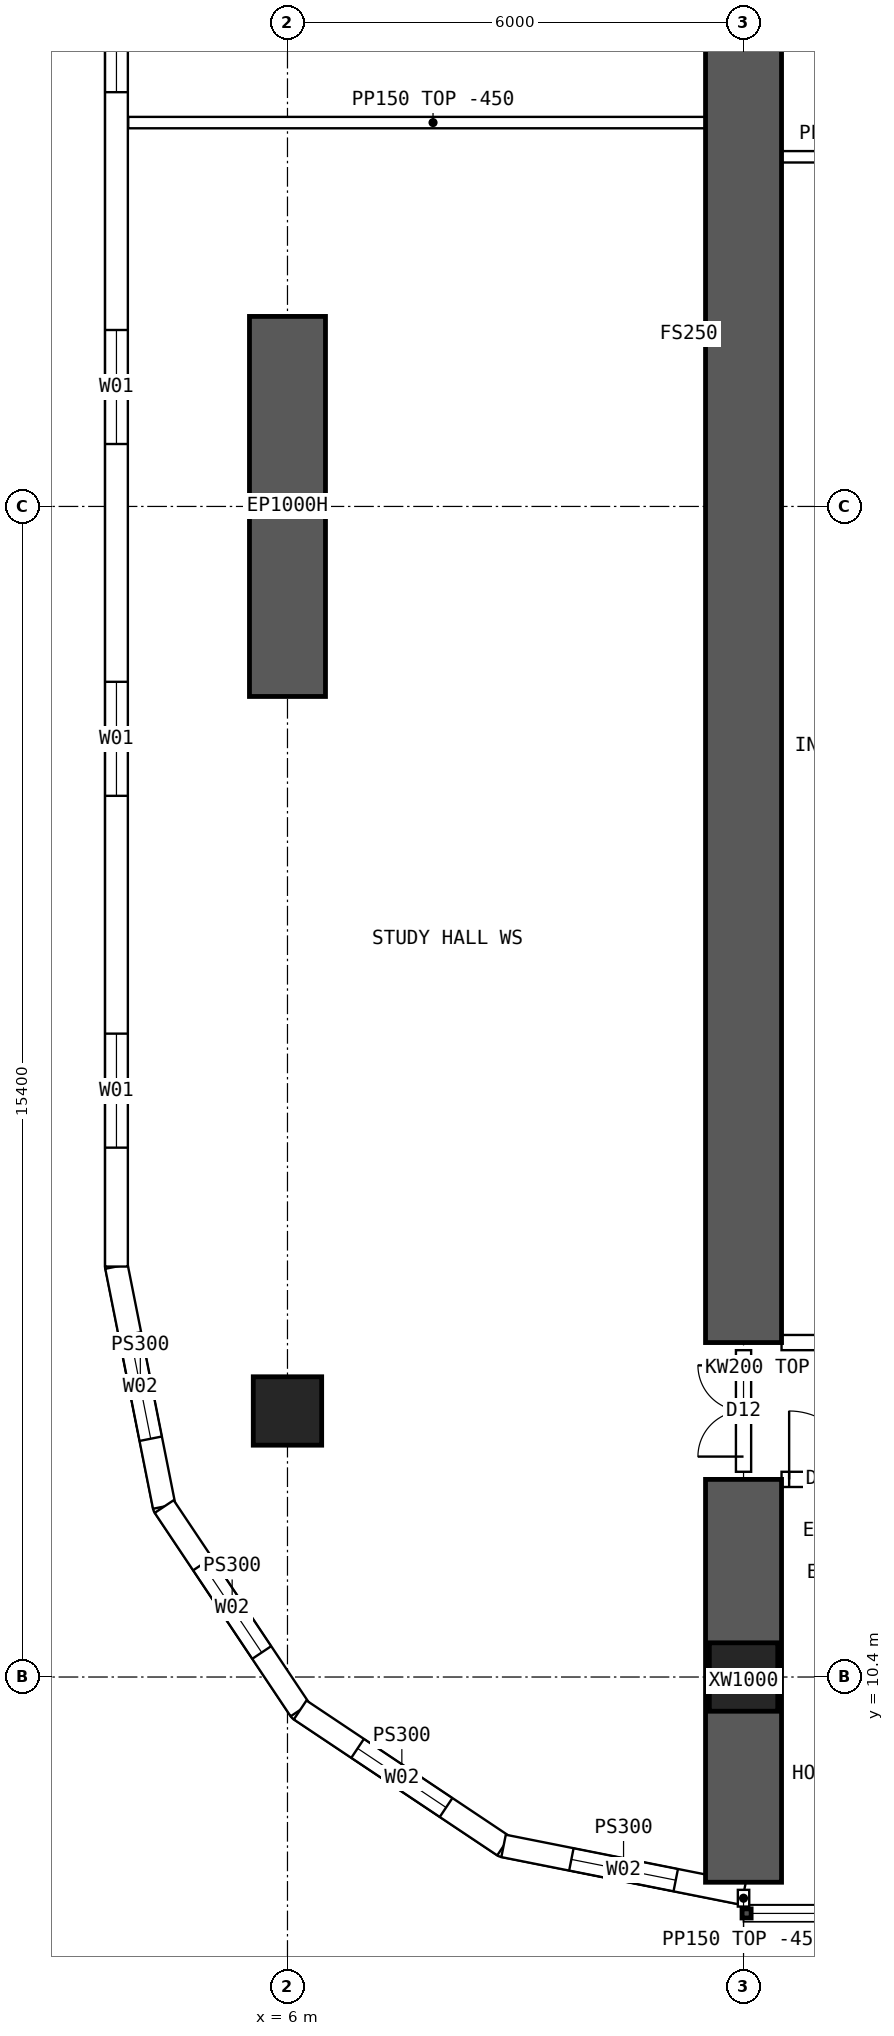
"""IFC4 building model, lengths in metres.
Left out: names, types, materials, properties, quantities, classifications, styles, units other than length and angle.
Written with IfcOpenShell. Run it as: python <this file> out.ifc"""

import sys

from ifc_helpers import new_model, si_unit, direction, frame, frame_2d, origin, origin_2d, place, context, subcontext, project, spatial, polyline, rectangle, hollow_rectangle, outline, extrude, element, fill, save


model = new_model("IFC4")
c1 = context("Model", 3, precision=1e-05, world=origin(), true_north=direction((0.0, 1.0)))
c2 = subcontext(c1, "Body", "Model", "MODEL_VIEW")
j1 = project(units=[si_unit("LENGTHUNIT", "METRE"), si_unit("PLANEANGLEUNIT", "RADIAN")], contexts=[c1])
p1 = place(None, origin())
s1 = spatial("IfcSite", under=j1, at=p1, CompositionType="ELEMENT")
p2 = place(p1, origin())
s2 = spatial("IfcBuilding", under=s1, at=p2, CompositionType="ELEMENT")
p3 = place(p2, frame((0.0, 0.0, 35.2)))
s3 = spatial("IfcBuildingStorey", under=s2, at=p3, CompositionType="ELEMENT", Elevation=35.2)
for number, where, z_axis, x_axis in (
    (1, (12.0, 10.4, 0.0), (0.0, 0.0, 1.0), (1.0, 0.0, 0.0)),
    (2, (6.0, 13.9, 0.0), (0.0, 0.0, 1.0), (1.0, 0.0, 0.0)),
):
    element("IfcColumn", number, at=place(p3, frame(where, z_axis=z_axis, x_axis=x_axis)), inside=s3, PredefinedType="COLUMN", context=c2, shape_type="SweptSolid", body=[
        extrude(hollow_rectangle(XDim=0.9, YDim=0.9, WallThickness=0.09, at=origin_2d()), origin(), (0.0, 0.0, 1.0), 3.75),
    ])
p4 = place(p3, frame((6.0, 23.3, 0.0), z_axis=(0.0, 0.0, 1.0), x_axis=(0.0, 1.0, 0.0)))
e3 = element("IfcWall", 3, at=p4, inside=s3, PredefinedType="SHEAR", context=c2, shape_type="SweptSolid", body=[
    extrude(rectangle(XDim=5.0, YDim=1.0, at=frame_2d((2.5, 0.0))), origin(), (0.0, 0.0, 1.0), 3.75),
])
p5 = place(p3, frame((12.0, 7.7, 0.0), z_axis=(0.0, 0.0, 1.0), x_axis=(0.0, 1.0, 0.0)))
e4 = element("IfcWall", 4, at=p5, inside=s3, PredefinedType="SHEAR", context=c2, shape_type="SweptSolid", body=[
    extrude(rectangle(XDim=5.3, YDim=1.0, at=frame_2d((2.65, 0.0))), origin(), (0.0, 0.0, 1.0), 3.75),
])
p6 = place(p3, frame((12.0, 14.8, 0.0), z_axis=(0.0, 0.0, 1.0), x_axis=(0.0, 1.0, 0.0)))
e5 = element("IfcWall", 5, at=p6, inside=s3, PredefinedType="SHEAR", context=c2, shape_type="SweptSolid", body=[
    extrude(rectangle(XDim=34.4, YDim=1.0, at=frame_2d((17.2, 0.0))), origin(), (0.0, 0.0, 1.0), 3.75),
])
p7 = place(p3, frame((3.75, 48.2, 0.0), z_axis=(0.0, 0.0, 1.0), x_axis=(0.0, -1.0, 0.0)))
e6 = element("IfcWall", 6, at=p7, inside=s3, PredefinedType="SOLIDWALL", context=c2, shape_type="SweptSolid", body=[
    extrude(outline(polyline([(-0.015, -0.15), (32.415, -0.15), (32.385, 0.15), (0.015, 0.15), (-0.015, -0.15)])), origin(), (0.0, 0.0, 1.0), 3.3),
])
p8 = place(p7, frame((1.564, 0.0, 0.9)))
e7 = element("IfcOpeningElement", 7, at=p8, cuts=e6, PredefinedType="OPENING", context=c2, shape_type="SweptSolid", body=[
    extrude(rectangle(XDim=1.5, YDim=2.0, at=frame_2d((0.75, 1.0))), frame((0.0, 0.16, 0.0), z_axis=(0.0, -1.0, 0.0), x_axis=(1.0, 0.0, 0.0)), (0.0, 0.0, 1.0), 0.32),
])
p9 = place(p7, frame((6.193, 0.0, 0.9)))
e8 = element("IfcOpeningElement", 8, at=p9, cuts=e6, PredefinedType="OPENING", context=c2, shape_type="SweptSolid", body=[
    extrude(rectangle(XDim=1.5, YDim=2.0, at=frame_2d((0.75, 1.0))), frame((0.0, 0.16, 0.0), z_axis=(0.0, -1.0, 0.0), x_axis=(1.0, 0.0, 0.0)), (0.0, 0.0, 1.0), 0.32),
])
p10 = place(p7, frame((10.822, 0.0, 0.9)))
e9 = element("IfcOpeningElement", 9, at=p10, cuts=e6, PredefinedType="OPENING", context=c2, shape_type="SweptSolid", body=[
    extrude(rectangle(XDim=1.5, YDim=2.0, at=frame_2d((0.75, 1.0))), frame((0.0, 0.16, 0.0), z_axis=(0.0, -1.0, 0.0), x_axis=(1.0, 0.0, 0.0)), (0.0, 0.0, 1.0), 0.32),
])
p11 = place(p7, frame((15.45, 0.0, 0.9)))
e10 = element("IfcOpeningElement", 10, at=p11, cuts=e6, PredefinedType="OPENING", context=c2, shape_type="SweptSolid", body=[
    extrude(rectangle(XDim=1.5, YDim=2.0, at=frame_2d((0.75, 1.0))), frame((0.0, 0.16, 0.0), z_axis=(0.0, -1.0, 0.0), x_axis=(1.0, 0.0, 0.0)), (0.0, 0.0, 1.0), 0.32),
])
p12 = place(p7, frame((20.079, 0.0, 0.9)))
e11 = element("IfcOpeningElement", 11, at=p12, cuts=e6, PredefinedType="OPENING", context=c2, shape_type="SweptSolid", body=[
    extrude(rectangle(XDim=1.5, YDim=2.0, at=frame_2d((0.75, 1.0))), frame((0.0, 0.16, 0.0), z_axis=(0.0, -1.0, 0.0), x_axis=(1.0, 0.0, 0.0)), (0.0, 0.0, 1.0), 0.32),
])
p13 = place(p7, frame((24.707, 0.0, 0.9)))
e12 = element("IfcOpeningElement", 12, at=p13, cuts=e6, PredefinedType="OPENING", context=c2, shape_type="SweptSolid", body=[
    extrude(rectangle(XDim=1.5, YDim=2.0, at=frame_2d((0.75, 1.0))), frame((0.0, 0.16, 0.0), z_axis=(0.0, -1.0, 0.0), x_axis=(1.0, 0.0, 0.0)), (0.0, 0.0, 1.0), 0.32),
])
p14 = place(p7, frame((29.336, 0.0, 0.9)))
e13 = element("IfcOpeningElement", 13, at=p14, cuts=e6, PredefinedType="OPENING", context=c2, shape_type="SweptSolid", body=[
    extrude(rectangle(XDim=1.5, YDim=2.0, at=frame_2d((0.75, 1.0))), frame((0.0, 0.16, 0.0), z_axis=(0.0, -1.0, 0.0), x_axis=(1.0, 0.0, 0.0)), (0.0, 0.0, 1.0), 0.32),
])
p15 = place(p3, frame((3.75, 15.8, 0.0), z_axis=(0.0, 0.0, 1.0), x_axis=(0.195065901187, -0.980790137692, 0.0)))
e14 = element("IfcWall", 14, at=p15, inside=s3, PredefinedType="SOLIDWALL", context=c2, shape_type="SweptSolid", body=[
    extrude(outline(polyline([(-0.015, -0.15), (3.249, -0.15), (3.189, 0.15), (0.015, 0.15), (-0.015, -0.15)])), origin(), (0.0, 0.0, 1.0), 3.3),
])
p16 = place(p15, frame((0.909, 0.0, 0.9)))
e15 = element("IfcOpeningElement", 15, at=p16, cuts=e14, PredefinedType="OPENING", context=c2, shape_type="SweptSolid", body=[
    extrude(rectangle(XDim=1.4, YDim=1.8, at=frame_2d((0.7, 0.9))), frame((0.0, 0.16, 0.0), z_axis=(0.0, -1.0, 0.0), x_axis=(1.0, 0.0, 0.0)), (0.0, 0.0, 1.0), 0.32),
])
p17 = place(p3, frame((4.378, 12.643, 0.0), z_axis=(0.0, 0.0, 1.0), x_axis=(0.555609954424, -0.831443069936, 0.0)))
e16 = element("IfcWall", 16, at=p17, inside=s3, PredefinedType="SOLIDWALL", context=c2, shape_type="SweptSolid", body=[
    extrude(outline(polyline([(-0.03, -0.15), (3.249, -0.15), (3.189, 0.15), (0.03, 0.15), (-0.03, -0.15)])), origin(), (0.0, 0.0, 1.0), 3.3),
])
p18 = place(p17, frame((0.909, 0.0, 0.9)))
e17 = element("IfcOpeningElement", 17, at=p18, cuts=e16, PredefinedType="OPENING", context=c2, shape_type="SweptSolid", body=[
    extrude(rectangle(XDim=1.4, YDim=1.8, at=frame_2d((0.7, 0.9))), frame((0.0, 0.16, 0.0), z_axis=(0.0, -1.0, 0.0), x_axis=(1.0, 0.0, 0.0)), (0.0, 0.0, 1.0), 0.32),
])
p19 = place(p3, frame((6.167, 9.966, 0.0), z_axis=(0.0, 0.0, 1.0), x_axis=(0.831478105043, -0.555557522525, 0.0)))
e18 = element("IfcWall", 18, at=p19, inside=s3, PredefinedType="SOLIDWALL", context=c2, shape_type="SweptSolid", body=[
    extrude(outline(polyline([(-0.03, -0.15), (3.249, -0.15), (3.189, 0.15), (0.03, 0.15), (-0.03, -0.15)])), origin(), (0.0, 0.0, 1.0), 3.3),
])
p20 = place(p19, frame((0.909, 0.0, 0.9)))
e19 = element("IfcOpeningElement", 19, at=p20, cuts=e18, PredefinedType="OPENING", context=c2, shape_type="SweptSolid", body=[
    extrude(rectangle(XDim=1.4, YDim=1.8, at=frame_2d((0.7, 0.9))), frame((0.0, 0.16, 0.0), z_axis=(0.0, -1.0, 0.0), x_axis=(1.0, 0.0, 0.0)), (0.0, 0.0, 1.0), 0.32),
])
p21 = place(p3, frame((8.843, 8.178, 0.0), z_axis=(0.0, 0.0, 1.0), x_axis=(0.980787251524, -0.195080412259, 0.0)))
e20 = element("IfcWall", 20, at=p21, inside=s3, PredefinedType="SOLIDWALL", context=c2, shape_type="SweptSolid", body=[
    extrude(outline(polyline([(-0.03, -0.15), (3.249, -0.15), (3.189, 0.15), (0.03, 0.15), (-0.03, -0.15)])), origin(), (0.0, 0.0, 1.0), 3.3),
])
p22 = place(p21, frame((0.909, 0.0, 0.9)))
e21 = element("IfcOpeningElement", 21, at=p22, cuts=e20, PredefinedType="OPENING", context=c2, shape_type="SweptSolid", body=[
    extrude(rectangle(XDim=1.4, YDim=1.8, at=frame_2d((0.7, 0.9))), frame((0.0, 0.16, 0.0), z_axis=(0.0, -1.0, 0.0), x_axis=(1.0, 0.0, 0.0)), (0.0, 0.0, 1.0), 0.32),
])
p23 = place(p3, frame((12.5, 13.0, 0.0), z_axis=(0.0, 0.0, 1.0), x_axis=(1.0, 0.0, 0.0)))
e22 = element("IfcWall", 22, at=p23, inside=s3, PredefinedType="SOLIDWALL", context=c2, shape_type="SweptSolid", body=[
    extrude(outline(polyline([(0.0, 0.0), (5.0, 0.0), (5.0, 2.9), (0.0, 2.9), (0.0, 0.0)])), frame((0.0, 0.1, 0.0), z_axis=(0.0, -1.0, 0.0), x_axis=(1.0, 0.0, 0.0)), (0.0, 0.0, 1.0), 0.2),
])
p24 = place(p23, frame((0.1, 0.0, 0.0)))
e23 = element("IfcOpeningElement", 23, at=p24, cuts=e22, PredefinedType="OPENING", context=c2, shape_type="SweptSolid", body=[
    extrude(rectangle(XDim=0.9, YDim=2.1, at=frame_2d((0.45, 1.05))), frame((0.0, 0.11, 0.0), z_axis=(0.0, -1.0, 0.0), x_axis=(1.0, 0.0, 0.0)), (0.0, 0.0, 1.0), 0.22),
])
p25 = place(p23, frame((4.0, 0.0, 0.0)))
e24 = element("IfcOpeningElement", 24, at=p25, cuts=e22, PredefinedType="OPENING", context=c2, shape_type="SweptSolid", body=[
    extrude(rectangle(XDim=0.9, YDim=2.1, at=frame_2d((0.45, 1.05))), frame((0.0, 0.11, 0.0), z_axis=(0.0, -1.0, 0.0), x_axis=(1.0, 0.0, 0.0)), (0.0, 0.0, 1.0), 0.22),
])
p26 = place(p3, frame((12.5, 14.8, 0.0), z_axis=(0.0, 0.0, 1.0), x_axis=(1.0, 0.0, 0.0)))
e25 = element("IfcWall", 25, at=p26, inside=s3, PredefinedType="SOLIDWALL", context=c2, shape_type="SweptSolid", body=[
    extrude(rectangle(XDim=5.0, YDim=0.2, at=frame_2d((2.5, 0.0))), origin(), (0.0, 0.0, 1.0), 3.3),
])
p27 = place(p26, frame((3.3, 0.0, 0.0)))
e26 = element("IfcOpeningElement", 26, at=p27, cuts=e25, PredefinedType="OPENING", context=c2, shape_type="SweptSolid", body=[
    extrude(rectangle(XDim=1.6, YDim=2.1, at=frame_2d((0.8, 1.05))), frame((0.0, 0.11, 0.0), z_axis=(0.0, -1.0, 0.0), x_axis=(1.0, 0.0, 0.0)), (0.0, 0.0, 1.0), 0.22),
])
p28 = place(p3, frame((12.0, 30.4, 0.0), z_axis=(0.0, 0.0, 1.0), x_axis=(1.0, 0.0, 0.0)))
e27 = element("IfcWall", 27, at=p28, inside=s3, PredefinedType="PARTITIONING", context=c2, shape_type="SweptSolid", body=[
    extrude(rectangle(XDim=3.6, YDim=0.15, at=frame_2d((1.8, 0.0))), origin(), (0.0, 0.0, 1.0), 3.3),
])
p29 = place(p3, frame((3.905, 30.85, 0.0), z_axis=(0.0, 0.0, 1.0), x_axis=(1.0, 0.0, 0.0)))
e28 = element("IfcWall", 28, at=p29, inside=s3, PredefinedType="PARTITIONING", context=c2, shape_type="SweptSolid", body=[
    extrude(outline(polyline([(0.0, 0.0), (8.02, 0.0), (8.02, 3.3), (2.397, 3.3), (2.395, 2.85), (1.797, 2.85), (1.795, 3.3), (0.0, 3.3), (0.0, 0.0)])), frame((0.0, 0.075, 0.0), z_axis=(0.0, -1.0, 0.0), x_axis=(1.0, 0.0, 0.0)), (0.0, 0.0, 1.0), 0.15),
])
p30 = place(p3, frame((12.0, 13.1, 0.0), z_axis=(0.0, 0.0, 1.0), x_axis=(0.0, 1.0, 0.0)))
e29 = element("IfcWall", 29, at=p30, inside=s3, PredefinedType="SOLIDWALL", context=c2, shape_type="SweptSolid", body=[
    extrude(outline(polyline([(0.0, 0.0), (1.6, 0.0), (1.6, 2.85), (0.0, 2.85), (0.0, 0.0)])), frame((0.0, 0.1, 0.0), z_axis=(0.0, -1.0, 0.0), x_axis=(1.0, 0.0, 0.0)), (0.0, 0.0, 1.0), 0.2),
])
p31 = place(p30, frame((0.2, 0.0, 0.0)))
e30 = element("IfcOpeningElement", 30, at=p31, cuts=e29, PredefinedType="OPENING", context=c2, shape_type="SweptSolid", body=[
    extrude(rectangle(XDim=1.2, YDim=2.1, at=frame_2d((0.6, 1.05))), frame((0.0, 0.11, 0.0), z_axis=(0.0, -1.0, 0.0), x_axis=(1.0, 0.0, 0.0)), (0.0, 0.0, 1.0), 0.22),
])
p32 = place(p3, frame((12.0, 7.6, 0.0), z_axis=(0.0, 0.0, 1.0), x_axis=(0.0, -1.0, 0.0)))
e31 = element("IfcWall", 31, at=p32, inside=s3, PredefinedType="PARTITIONING", context=c2, shape_type="SweptSolid", body=[
    extrude(rectangle(XDim=0.22, YDim=0.15, at=frame_2d((0.11, 0.0))), origin(), (0.0, 0.0, 1.0), 3.3),
])
p33 = place(p11, origin())
e32 = element("IfcWindow", 32, at=p33, inside=s3, PartitioningType="SINGLE_PANEL", PredefinedType="WINDOW", context=c2, shape_type="SweptSolid", body=[
    extrude(rectangle(XDim=1.5, YDim=2.0, at=frame_2d((0.75, 1.0))), frame((0.0, 0.03, 0.0), z_axis=(0.0, -1.0, 0.0), x_axis=(1.0, 0.0, 0.0)), (0.0, 0.0, 1.0), 0.06),
])
fill(e10, e32)
p34 = place(p12, origin())
e33 = element("IfcWindow", 33, at=p34, inside=s3, PartitioningType="SINGLE_PANEL", PredefinedType="WINDOW", context=c2, shape_type="SweptSolid", body=[
    extrude(rectangle(XDim=1.5, YDim=2.0, at=frame_2d((0.75, 1.0))), frame((0.0, 0.03, 0.0), z_axis=(0.0, -1.0, 0.0), x_axis=(1.0, 0.0, 0.0)), (0.0, 0.0, 1.0), 0.06),
])
fill(e11, e33)
p35 = place(p13, origin())
e34 = element("IfcWindow", 34, at=p35, inside=s3, PartitioningType="SINGLE_PANEL", PredefinedType="WINDOW", context=c2, shape_type="SweptSolid", body=[
    extrude(rectangle(XDim=1.5, YDim=2.0, at=frame_2d((0.75, 1.0))), frame((0.0, 0.03, 0.0), z_axis=(0.0, -1.0, 0.0), x_axis=(1.0, 0.0, 0.0)), (0.0, 0.0, 1.0), 0.06),
])
fill(e12, e34)
p36 = place(p14, origin())
e35 = element("IfcWindow", 35, at=p36, inside=s3, PartitioningType="SINGLE_PANEL", PredefinedType="WINDOW", context=c2, shape_type="SweptSolid", body=[
    extrude(rectangle(XDim=1.5, YDim=2.0, at=frame_2d((0.75, 1.0))), frame((0.0, 0.03, 0.0), z_axis=(0.0, -1.0, 0.0), x_axis=(1.0, 0.0, 0.0)), (0.0, 0.0, 1.0), 0.06),
])
fill(e13, e35)
p37 = place(p16, origin())
e36 = element("IfcWindow", 36, at=p37, inside=s3, PartitioningType="SINGLE_PANEL", PredefinedType="WINDOW", context=c2, shape_type="SweptSolid", body=[
    extrude(rectangle(XDim=1.4, YDim=1.8, at=frame_2d((0.7, 0.9))), frame((0.0, 0.03, 0.0), z_axis=(0.0, -1.0, 0.0), x_axis=(1.0, 0.0, 0.0)), (0.0, 0.0, 1.0), 0.06),
])
fill(e15, e36)
p38 = place(p18, origin())
e37 = element("IfcWindow", 37, at=p38, inside=s3, PartitioningType="SINGLE_PANEL", PredefinedType="WINDOW", context=c2, shape_type="SweptSolid", body=[
    extrude(rectangle(XDim=1.4, YDim=1.8, at=frame_2d((0.7, 0.9))), frame((0.0, 0.03, 0.0), z_axis=(0.0, -1.0, 0.0), x_axis=(1.0, 0.0, 0.0)), (0.0, 0.0, 1.0), 0.06),
])
fill(e17, e37)
p39 = place(p20, origin())
e38 = element("IfcWindow", 38, at=p39, inside=s3, PartitioningType="SINGLE_PANEL", PredefinedType="WINDOW", context=c2, shape_type="SweptSolid", body=[
    extrude(rectangle(XDim=1.4, YDim=1.8, at=frame_2d((0.7, 0.9))), frame((0.0, 0.03, 0.0), z_axis=(0.0, -1.0, 0.0), x_axis=(1.0, 0.0, 0.0)), (0.0, 0.0, 1.0), 0.06),
])
fill(e19, e38)
p40 = place(p22, origin())
e39 = element("IfcWindow", 39, at=p40, inside=s3, PartitioningType="SINGLE_PANEL", PredefinedType="WINDOW", context=c2, shape_type="SweptSolid", body=[
    extrude(rectangle(XDim=1.4, YDim=1.8, at=frame_2d((0.7, 0.9))), frame((0.0, 0.03, 0.0), z_axis=(0.0, -1.0, 0.0), x_axis=(1.0, 0.0, 0.0)), (0.0, 0.0, 1.0), 0.06),
])
fill(e21, e39)
p41 = place(p24, origin())
e40 = element("IfcDoor", 40, at=p41, inside=s3, OperationType="SINGLE_SWING_LEFT", PredefinedType="DOOR", context=c2, shape_type="SweptSolid", body=[
    extrude(rectangle(XDim=0.9, YDim=2.1, at=frame_2d((0.45, 1.05))), frame((0.0, 0.025, 0.0), z_axis=(0.0, -1.0, 0.0), x_axis=(1.0, 0.0, 0.0)), (0.0, 0.0, 1.0), 0.05),
])
fill(e23, e40)
p42 = place(p31, origin())
e41 = element("IfcDoor", 41, at=p42, inside=s3, OperationType="DOUBLE_DOOR_SINGLE_SWING", PredefinedType="DOOR", context=c2, shape_type="SweptSolid", body=[
    extrude(rectangle(XDim=1.2, YDim=2.1, at=frame_2d((0.6, 1.05))), frame((0.0, 0.025, 0.0), z_axis=(0.0, -1.0, 0.0), x_axis=(1.0, 0.0, 0.0)), (0.0, 0.0, 1.0), 0.05),
])
fill(e30, e41)
save(model, sys.argv[1])
